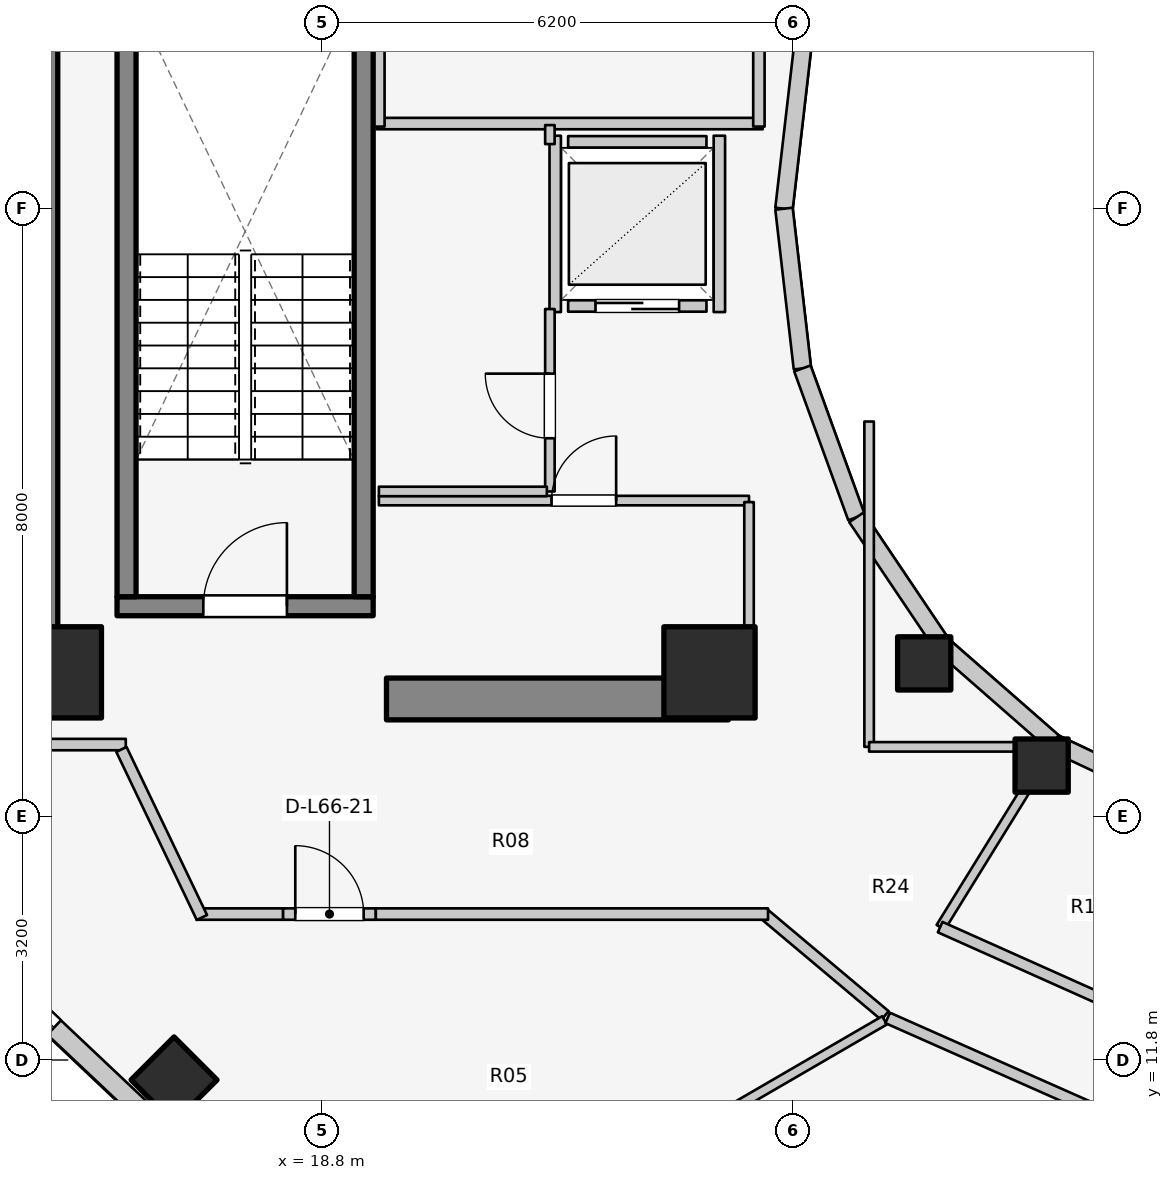
"""IFC4 building model, lengths in metres.
Left out: names, types, materials, properties, quantities, classifications, styles, units other than length and angle.
Written with IfcOpenShell. Run it as: python <this file> out.ifc"""

import sys

from ifc_helpers import new_model, si_unit, direction, frame, frame_2d, origin, origin_2d, place, context, subcontext, project, spatial, rectangle, extrude, element, fill, save


model = new_model("IFC4")
c1 = context("Model", 3, precision=1e-05, world=origin(), true_north=direction((0.0, 1.0)))
c2 = subcontext(c1, "Body", "Model", "MODEL_VIEW")
j1 = project(units=[si_unit("LENGTHUNIT", "METRE"), si_unit("PLANEANGLEUNIT", "RADIAN")], contexts=[c1])
p1 = place(None, origin())
s1 = spatial("IfcSite", under=j1, at=p1, CompositionType="ELEMENT")
p2 = place(p1, origin())
s2 = spatial("IfcBuilding", under=s1, at=p2, CompositionType="ELEMENT")
p3 = place(p2, frame((0.0, 0.0, 217.1)))
s3 = spatial("IfcBuildingStorey", under=s2, at=p3, CompositionType="ELEMENT", Elevation=217.1)
p4 = place(p3, frame((15.05, 17.05, 0.0), z_axis=(0.0, 0.0, 1.0), x_axis=(0.0, 1.0, 0.0)))
e1 = element("IfcWall", 1, at=p4, inside=s3, PredefinedType="SHEAR", context=c2, shape_type="SweptSolid", body=[
    extrude(rectangle(XDim=12.8, YDim=0.55, at=frame_2d((6.4, 0.0))), origin(), (0.0, 0.0, 1.0), 3.1),
])
p5 = place(p3, frame((19.65, 16.55, 0.0), z_axis=(0.0, 0.0, 1.0), x_axis=(1.0, 0.0, 0.0)))
e2 = element("IfcWall", 2, at=p5, inside=s3, PredefinedType="SHEAR", context=c2, shape_type="SweptSolid", body=[
    extrude(rectangle(XDim=4.5, YDim=0.55, at=frame_2d((2.25, 0.0))), origin(), (0.0, 0.0, 1.0), 3.1),
])
p6 = place(p3, frame((16.105, 17.77, 0.0), z_axis=(0.0, 0.0, 1.0), x_axis=(1.0, 0.0, 0.0)))
e3 = element("IfcWall", 3, at=p6, inside=s3, PredefinedType="SOLIDWALL", context=c2, shape_type="SweptSolid", body=[
    extrude(rectangle(XDim=3.37, YDim=0.25, at=frame_2d((1.685, 0.0))), origin(), (0.0, 0.0, 1.0), 3.1),
])
p7 = place(p6, frame((1.135, 0.0, 0.0)))
e4 = element("IfcOpeningElement", 4, at=p7, cuts=e3, PredefinedType="OPENING", context=c2, shape_type="SweptSolid", body=[
    extrude(rectangle(XDim=1.1, YDim=2.1, at=frame_2d((0.55, 1.05))), frame((0.0, 0.135, 0.0), z_axis=(0.0, -1.0, 0.0), x_axis=(1.0, 0.0, 0.0)), (0.0, 0.0, 1.0), 0.27),
])
for number, where, z_axis, x_axis in (
    (5, (16.23, 17.895, 0.0), (0.0, 0.0, 1.0), (0.0, 1.0, 0.0)),
    (6, (19.35, 17.895, 0.0), (0.0, 0.0, 1.0), (0.0, 1.0, 0.0)),
):
    element("IfcWall", number, at=place(p3, frame(where, z_axis=z_axis, x_axis=x_axis)), inside=s3, PredefinedType="SOLIDWALL", context=c2, shape_type="SweptSolid", body=[
        extrude(rectangle(XDim=7.81, YDim=0.25, at=frame_2d((3.905, 0.0))), origin(), (0.0, 0.0, 1.0), 3.1),
    ])
for number, where, z_axis, x_axis in (
    (7, (15.3, 16.9, 0.0), (0.0, 0.0, 1.0), (1.0, 0.0, 0.0)),
    (8, (23.9, 16.9, 0.0), (0.0, 0.0, 1.0), (1.0, 0.0, 0.0)),
):
    element("IfcColumn", number, at=place(p3, frame(where, z_axis=z_axis, x_axis=x_axis)), inside=s3, PredefinedType="COLUMN", context=c2, shape_type="SweptSolid", body=[
        extrude(rectangle(XDim=1.2, YDim=1.2, at=origin_2d()), origin(), (0.0, 0.0, 1.0), 3.1),
    ])
p8 = place(p3, frame((26.725, 17.018, 0.0), z_axis=(0.0, 0.0, 1.0), x_axis=(1.0, 0.0, 0.0)))
e9 = element("IfcColumn", 9, at=p8, inside=s3, PredefinedType="COLUMN", context=c2, shape_type="SweptSolid", body=[
    extrude(rectangle(XDim=0.7, YDim=0.7, at=origin_2d()), origin(), (0.0, 0.0, 1.0), 3.1),
])
p9 = place(p3, frame((16.855, 11.538, 0.0), z_axis=(0.0, 0.0, 1.0), x_axis=(-0.707106781187, -0.707106781187, 0.0)))
e10 = element("IfcColumn", 10, at=p9, inside=s3, PredefinedType="COLUMN", context=c2, shape_type="SweptSolid", body=[
    extrude(rectangle(XDim=0.8, YDim=0.8, at=origin_2d()), origin(), (0.0, 0.0, 1.0), 3.1),
])
p10 = place(p3, frame((28.27, 15.673, 0.0), z_axis=(0.0, 0.0, 1.0), x_axis=(1.0, 0.0, 0.0)))
e11 = element("IfcColumn", 11, at=p10, inside=s3, PredefinedType="COLUMN", context=c2, shape_type="SweptSolid", body=[
    extrude(rectangle(XDim=0.7, YDim=0.7, at=origin_2d()), origin(), (0.0, 0.0, 1.0), 3.1),
])
for number, where, z_axis, x_axis in (
    (12, (25.123, 25.102, 0.0), (0.0, 0.0, 1.0), (-0.115, -0.993, 0.0)),
    (13, (24.88, 23.0, 0.0), (0.0, 0.0, 1.0), (0.115, -0.993, 0.0)),
):
    element("IfcWall", number, at=place(p3, frame(where, z_axis=z_axis, x_axis=x_axis)), inside=s3, PredefinedType="STANDARD", context=c2, shape_type="SweptSolid", body=[
        extrude(rectangle(XDim=2.115, YDim=0.23, at=frame_2d((1.058, 0.0))), origin(), (0.0, 0.0, 1.0), 2.56),
    ])
p11 = place(p3, frame((25.123, 20.898, 0.0), z_axis=(0.0, 0.0, 1.0), x_axis=(0.341423187295, -0.93990968033, 0.0)))
e14 = element("IfcWall", 14, at=p11, inside=s3, PredefinedType="STANDARD", context=c2, shape_type="SweptSolid", body=[
    extrude(rectangle(XDim=2.084, YDim=0.23, at=frame_2d((1.042, 0.0))), origin(), (0.0, 0.0, 1.0), 2.56),
])
p12 = place(p3, frame((25.834, 18.94, 0.0), z_axis=(0.0, 0.0, 1.0), x_axis=(0.558197800898, -0.829707909492, 0.0)))
e15 = element("IfcWall", 15, at=p12, inside=s3, PredefinedType="STANDARD", context=c2, shape_type="SweptSolid", body=[
    extrude(rectangle(XDim=2.027, YDim=0.23, at=frame_2d((1.013, 0.0))), origin(), (0.0, 0.0, 1.0), 1.22),
])
p13 = place(p3, frame((26.965, 17.258, 0.0), z_axis=(0.0, 0.0, 1.0), x_axis=(0.752576694707, -0.658504607869, 0.0)))
e16 = element("IfcWall", 16, at=p13, inside=s3, PredefinedType="STANDARD", context=c2, shape_type="SweptSolid", body=[
    extrude(rectangle(XDim=1.959, YDim=0.23, at=frame_2d((0.98, 0.0))), origin(), (0.0, 0.0, 1.0), 1.22),
])
p14 = place(p3, frame((28.44, 15.968, 0.0), z_axis=(0.0, 0.0, 1.0), x_axis=(0.904179699603, -0.427152280606, 0.0)))
e17 = element("IfcWall", 17, at=p14, inside=s3, PredefinedType="STANDARD", context=c2, shape_type="SweptSolid", body=[
    extrude(rectangle(XDim=1.899, YDim=0.23, at=frame_2d((0.95, 0.0))), origin(), (0.0, 0.0, 1.0), 1.22),
])
p15 = place(p3, frame((13.239, 14.151, 0.0), z_axis=(0.0, 0.0, 1.0), x_axis=(0.72731899451, -0.686299555752, 0.0)))
e18 = element("IfcWall", 18, at=p15, inside=s3, PredefinedType="STANDARD", context=c2, shape_type="SweptSolid", body=[
    extrude(rectangle(XDim=4.404, YDim=0.26, at=frame_2d((2.202, 0.0))), origin(), (0.0, 0.0, 1.0), 1.22),
])
p16 = place(p15, frame((1.602, 0.0, 0.15)))
e19 = element("IfcOpeningElement", 19, at=p16, cuts=e18, PredefinedType="OPENING", context=c2, shape_type="SweptSolid", body=[
    extrude(rectangle(XDim=1.2, YDim=0.9, at=frame_2d((0.6, 0.45))), frame((0.0, 0.14, 0.0), z_axis=(0.0, -1.0, 0.0), x_axis=(1.0, 0.0, 0.0)), (0.0, 0.0, 1.0), 0.28),
])
p17 = place(p3, frame((22.04, 21.72, 0.0), z_axis=(0.0, 0.0, 1.0), x_axis=(1.0, 0.0, 0.0)))
e20 = element("IfcWall", 20, at=p17, inside=s3, PredefinedType="SOLIDWALL", context=c2, shape_type="SweptSolid", body=[
    extrude(rectangle(XDim=1.82, YDim=0.15, at=frame_2d((0.91, 0.0))), origin(), (0.0, 0.0, 1.0), 2.12),
])
p18 = place(p17, frame((0.36, 0.0, 0.0)))
e21 = element("IfcOpeningElement", 21, at=p18, cuts=e20, PredefinedType="OPENING", context=c2, shape_type="SweptSolid", body=[
    extrude(rectangle(XDim=1.1, YDim=2.1, at=frame_2d((0.55, 1.05))), frame((0.0, 0.085, 0.0), z_axis=(0.0, -1.0, 0.0), x_axis=(1.0, 0.0, 0.0)), (0.0, 0.0, 1.0), 0.17),
])
p19 = place(p3, frame((22.04, 23.88, 0.0), z_axis=(0.0, 0.0, 1.0), x_axis=(1.0, 0.0, 0.0)))
e22 = element("IfcWall", 22, at=p19, inside=s3, PredefinedType="SOLIDWALL", context=c2, shape_type="SweptSolid", body=[
    extrude(rectangle(XDim=1.82, YDim=0.15, at=frame_2d((0.91, 0.0))), origin(), (0.0, 0.0, 1.0), 2.12),
])
p20 = place(p3, frame((21.87, 21.64, 0.0), z_axis=(0.0, 0.0, 1.0), x_axis=(0.0, 1.0, 0.0)))
e23 = element("IfcWall", 23, at=p20, inside=s3, PredefinedType="SOLIDWALL", context=c2, shape_type="SweptSolid", body=[
    extrude(rectangle(XDim=2.32, YDim=0.15, at=frame_2d((1.16, 0.0))), origin(), (0.0, 0.0, 1.0), 2.575),
])
p21 = place(p3, frame((24.03, 21.64, 0.0), z_axis=(0.0, 0.0, 1.0), x_axis=(0.0, 1.0, 0.0)))
e24 = element("IfcWall", 24, at=p21, inside=s3, PredefinedType="SOLIDWALL", context=c2, shape_type="SweptSolid", body=[
    extrude(rectangle(XDim=2.32, YDim=0.15, at=frame_2d((1.16, 0.0))), origin(), (0.0, 0.0, 1.0), 2.12),
])
p22 = place(p3, frame((19.52, 24.12, 0.0), z_axis=(0.0, 0.0, 1.0), x_axis=(1.0, 0.0, 0.0)))
e25 = element("IfcWall", 25, at=p22, inside=s3, PredefinedType="PARTITIONING", context=c2, shape_type="SweptSolid", body=[
    extrude(rectangle(XDim=5.08, YDim=0.15, at=frame_2d((2.54, 0.0))), origin(), (0.0, 0.0, 1.0), 2.12),
])
p23 = place(p3, frame((19.55, 24.08, 0.0), z_axis=(0.0, 0.0, 1.0), x_axis=(0.0, 1.0, 0.0)))
e26 = element("IfcWall", 26, at=p23, inside=s3, PredefinedType="PARTITIONING", context=c2, shape_type="SweptSolid", body=[
    extrude(rectangle(XDim=3.2, YDim=0.15, at=frame_2d((1.6, 0.0))), origin(), (0.0, 0.0, 1.0), 2.575),
])
p24 = place(p3, frame((24.55, 24.08, 0.0), z_axis=(0.0, 0.0, 1.0), x_axis=(0.0, 1.0, 0.0)))
e27 = element("IfcWall", 27, at=p24, inside=s3, PredefinedType="PARTITIONING", context=c2, shape_type="SweptSolid", body=[
    extrude(rectangle(XDim=3.4, YDim=0.15, at=frame_2d((1.7, 0.0))), origin(), (0.0, 0.0, 1.0), 2.575),
])
p25 = place(p24, frame((1.894, 0.0, 0.0)))
e28 = element("IfcOpeningElement", 28, at=p25, cuts=e27, PredefinedType="OPENING", context=c2, shape_type="SweptSolid", body=[
    extrude(rectangle(XDim=1.1, YDim=2.1, at=frame_2d((0.55, 1.05))), frame((0.0, 0.085, 0.0), z_axis=(0.0, -1.0, 0.0), x_axis=(1.0, 0.0, 0.0)), (0.0, 0.0, 1.0), 0.17),
])
p26 = place(p3, frame((19.55, 19.16, 0.0), z_axis=(0.0, 0.0, 1.0), x_axis=(1.0, 0.0, 0.0)))
e29 = element("IfcWall", 29, at=p26, inside=s3, PredefinedType="PARTITIONING", context=c2, shape_type="SweptSolid", body=[
    extrude(rectangle(XDim=4.87, YDim=0.125, at=frame_2d((2.435, 0.0))), origin(), (0.0, 0.0, 1.0), 2.12),
])
p27 = place(p26, frame((2.272, 0.0, 0.0)))
e30 = element("IfcOpeningElement", 30, at=p27, cuts=e29, PredefinedType="OPENING", context=c2, shape_type="SweptSolid", body=[
    extrude(rectangle(XDim=0.85, YDim=2.05, at=frame_2d((0.425, 1.025))), frame((0.0, 0.073, 0.0), z_axis=(0.0, -1.0, 0.0), x_axis=(1.0, 0.0, 0.0)), (0.0, 0.0, 1.0), 0.145),
])
p28 = place(p3, frame((24.42, 17.1, 0.0), z_axis=(0.0, 0.0, 1.0), x_axis=(0.0, 1.0, 0.0)))
e31 = element("IfcWall", 31, at=p28, inside=s3, PredefinedType="PARTITIONING", context=c2, shape_type="SweptSolid", body=[
    extrude(rectangle(XDim=2.04, YDim=0.125, at=frame_2d((1.02, 0.0))), origin(), (0.0, 0.0, 1.0), 1.952),
])
p29 = place(p3, frame((21.8, 19.28, 0.0), z_axis=(0.0, 0.0, 1.0), x_axis=(0.0, 1.0, 0.0)))
e32 = element("IfcWall", 32, at=p29, inside=s3, PredefinedType="PARTITIONING", context=c2, shape_type="SweptSolid", body=[
    extrude(rectangle(XDim=2.4, YDim=0.125, at=frame_2d((1.2, 0.0))), origin(), (0.0, 0.0, 1.0), 2.575),
])
p30 = place(p29, frame((0.7, 0.0, 0.0)))
e33 = element("IfcOpeningElement", 33, at=p30, cuts=e32, PredefinedType="OPENING", context=c2, shape_type="SweptSolid", body=[
    extrude(rectangle(XDim=0.85, YDim=2.05, at=frame_2d((0.425, 1.025))), frame((0.0, 0.073, 0.0), z_axis=(0.0, -1.0, 0.0), x_axis=(1.0, 0.0, 0.0)), (0.0, 0.0, 1.0), 0.145),
])
p31 = place(p3, frame((21.8, 23.85, 0.0), z_axis=(0.0, 0.0, 1.0), x_axis=(0.0, 1.0, 0.0)))
e34 = element("IfcWall", 34, at=p31, inside=s3, PredefinedType="PARTITIONING", context=c2, shape_type="SweptSolid", body=[
    extrude(rectangle(XDim=0.25, YDim=0.125, at=frame_2d((0.125, 0.0))), origin(), (0.0, 0.0, 1.0), 2.575),
])
p32 = place(p3, frame((19.55, 19.28, 0.0), z_axis=(0.0, 0.0, 1.0), x_axis=(1.0, 0.0, 0.0)))
e35 = element("IfcWall", 35, at=p32, inside=s3, PredefinedType="PARTITIONING", context=c2, shape_type="SweptSolid", body=[
    extrude(rectangle(XDim=2.21, YDim=0.125, at=frame_2d((1.105, 0.0))), origin(), (0.0, 0.0, 1.0), 2.12),
])
p33 = place(p3, frame((28.45, 15.985, 0.0), z_axis=(0.0, 0.0, 1.0), x_axis=(-0.52592395012, -0.850531597702, 0.0)))
e36 = element("IfcWall", 36, at=p33, inside=s3, PredefinedType="PARTITIONING", context=c2, shape_type="SweptSolid", body=[
    extrude(rectangle(XDim=2.869, YDim=0.125, at=frame_2d((1.435, 0.0))), origin(), (0.0, 0.0, 1.0), 1.22),
])
p34 = place(p3, frame((26.935, 13.549, 0.0), z_axis=(0.0, 0.0, 1.0), x_axis=(0.912859324183, -0.408274239027, 0.0)))
e37 = element("IfcWall", 37, at=p34, inside=s3, PredefinedType="PARTITIONING", context=c2, shape_type="SweptSolid", body=[
    extrude(rectangle(XDim=2.682, YDim=0.15, at=frame_2d((1.341, 0.0))), origin(), (0.0, 0.0, 1.0), 1.22),
])
p35 = place(p3, frame((26.0, 15.92, 0.0), z_axis=(0.0, 0.0, 1.0), x_axis=(0.0, 1.0, 0.0)))
e38 = element("IfcWall", 38, at=p35, inside=s3, PredefinedType="PARTITIONING", context=c2, shape_type="SweptSolid", body=[
    extrude(rectangle(XDim=4.28, YDim=0.125, at=frame_2d((2.14, 0.0))), origin(), (0.0, 0.0, 1.0), 1.22),
])
p36 = place(p3, frame((26.0, 15.92, 0.0), z_axis=(0.0, 0.0, 1.0), x_axis=(1.0, 0.0, 0.0)))
e39 = element("IfcWall", 39, at=p36, inside=s3, PredefinedType="PARTITIONING", context=c2, shape_type="SweptSolid", body=[
    extrude(rectangle(XDim=2.6, YDim=0.125, at=frame_2d((1.3, 0.0))), origin(), (0.0, 0.0, 1.0), 1.22),
])
p37 = place(p3, frame((11.98, 15.95, 0.0), z_axis=(0.0, 0.0, 1.0), x_axis=(1.0, 0.0, 0.0)))
e40 = element("IfcWall", 40, at=p37, inside=s3, PredefinedType="PARTITIONING", context=c2, shape_type="SweptSolid", body=[
    extrude(rectangle(XDim=4.24, YDim=0.15, at=frame_2d((2.12, 0.0))), origin(), (0.0, 0.0, 1.0), 1.22),
])
p38 = place(p3, frame((26.209, 12.385, 0.0), z_axis=(0.0, 0.0, 1.0), x_axis=(-0.765677451641, 0.643224719711, 0.0)))
e41 = element("IfcWall", 41, at=p38, inside=s3, PredefinedType="PARTITIONING", context=c2, shape_type="SweptSolid", body=[
    extrude(rectangle(XDim=2.105, YDim=0.15, at=frame_2d((1.053, 0.0))), origin(), (0.0, 0.0, 1.0), 1.22),
])
p39 = place(p3, frame((17.15, 13.72, 0.0), z_axis=(0.0, 0.0, 1.0), x_axis=(1.0, 0.0, 0.0)))
e42 = element("IfcWall", 42, at=p39, inside=s3, PredefinedType="PARTITIONING", context=c2, shape_type="SweptSolid", body=[
    extrude(rectangle(XDim=1.14, YDim=0.15, at=frame_2d((0.57, 0.0))), origin(), (0.0, 0.0, 1.0), 2.575),
])
p40 = place(p3, frame((18.29, 13.72, 0.0), z_axis=(0.0, 0.0, 1.0), x_axis=(1.0, 0.0, 0.0)))
e43 = element("IfcWall", 43, at=p40, inside=s3, PredefinedType="PARTITIONING", context=c2, shape_type="SweptSolid", body=[
    extrude(rectangle(XDim=1.22, YDim=0.15, at=frame_2d((0.61, 0.0))), origin(), (0.0, 0.0, 1.0), 2.575),
])
p41 = place(p40, frame((0.16, 0.0, 0.0)))
e44 = element("IfcOpeningElement", 44, at=p41, cuts=e43, PredefinedType="OPENING", context=c2, shape_type="SweptSolid", body=[
    extrude(rectangle(XDim=0.9, YDim=2.1, at=frame_2d((0.45, 1.05))), frame((0.0, 0.085, 0.0), z_axis=(0.0, -1.0, 0.0), x_axis=(1.0, 0.0, 0.0)), (0.0, 0.0, 1.0), 0.17),
])
p42 = place(p3, frame((19.51, 13.72, 0.0), z_axis=(0.0, 0.0, 1.0), x_axis=(1.0, 0.0, 0.0)))
e45 = element("IfcWall", 45, at=p42, inside=s3, PredefinedType="PARTITIONING", context=c2, shape_type="SweptSolid", body=[
    extrude(rectangle(XDim=5.16, YDim=0.15, at=frame_2d((2.58, 0.0))), origin(), (0.0, 0.0, 1.0), 1.22),
])
p43 = place(p3, frame((17.222, 13.675, 0.0), z_axis=(0.0, 0.0, 1.0), x_axis=(-0.431973389813, 0.901886351207, 0.0)))
e46 = element("IfcWall", 46, at=p43, inside=s3, PredefinedType="PARTITIONING", context=c2, shape_type="SweptSolid", body=[
    extrude(rectangle(XDim=2.452, YDim=0.15, at=frame_2d((1.226, 0.0))), origin(), (0.0, 0.0, 1.0), 2.575),
])
p44 = place(p3, frame((26.203, 12.322, 0.0), z_axis=(0.0, 0.0, 1.0), x_axis=(-0.864712462127, -0.502267217567, 0.0)))
e47 = element("IfcWall", 47, at=p44, inside=s3, PredefinedType="PARTITIONING", context=c2, shape_type="SweptSolid", body=[
    extrude(rectangle(XDim=6.439, YDim=0.125, at=frame_2d((3.22, 0.0))), origin(), (0.0, 0.0, 1.0), 1.22),
])
p45 = place(p3, frame((26.244, 12.354, 0.0), z_axis=(0.0, 0.0, 1.0), x_axis=(0.914302802833, -0.405031337963, 0.0)))
e48 = element("IfcWall", 48, at=p45, inside=s3, PredefinedType="PARTITIONING", context=c2, shape_type="SweptSolid", body=[
    extrude(rectangle(XDim=3.049, YDim=0.15, at=frame_2d((1.525, 0.0))), origin(), (0.0, 0.0, 1.0), 1.22),
])
p46 = place(p16, origin())
e49 = element("IfcWindow", 49, at=p46, inside=s3, PartitioningType="SINGLE_PANEL", PredefinedType="WINDOW", context=c2, shape_type="SweptSolid", body=[
    extrude(rectangle(XDim=1.2, YDim=0.9, at=frame_2d((0.6, 0.45))), frame((0.0, 0.03, 0.0), z_axis=(0.0, -1.0, 0.0), x_axis=(1.0, 0.0, 0.0)), (0.0, 0.0, 1.0), 0.06),
])
fill(e19, e49)
p47 = place(p7, origin())
e50 = element("IfcDoor", 50, at=p47, inside=s3, OperationType="SINGLE_SWING_RIGHT", PredefinedType="DOOR", context=c2, shape_type="SweptSolid", body=[
    extrude(rectangle(XDim=1.1, YDim=2.1, at=frame_2d((0.55, 1.05))), frame((0.0, 0.025, 0.0), z_axis=(0.0, -1.0, 0.0), x_axis=(1.0, 0.0, 0.0)), (0.0, 0.0, 1.0), 0.05),
])
fill(e4, e50)
p48 = place(p18, origin())
e51 = element("IfcDoor", 51, at=p48, inside=s3, OperationType="DOUBLE_DOOR_SLIDING", PredefinedType="DOOR", context=c2, shape_type="SweptSolid", body=[
    extrude(rectangle(XDim=1.1, YDim=2.1, at=frame_2d((0.55, 1.05))), frame((0.0, 0.025, 0.0), z_axis=(0.0, -1.0, 0.0), x_axis=(1.0, 0.0, 0.0)), (0.0, 0.0, 1.0), 0.05),
])
fill(e21, e51)
p49 = place(p27, origin())
e52 = element("IfcDoor", 52, at=p49, inside=s3, OperationType="SINGLE_SWING_RIGHT", PredefinedType="DOOR", context=c2, shape_type="SweptSolid", body=[
    extrude(rectangle(XDim=0.85, YDim=2.05, at=frame_2d((0.425, 1.025))), frame((0.0, 0.025, 0.0), z_axis=(0.0, -1.0, 0.0), x_axis=(1.0, 0.0, 0.0)), (0.0, 0.0, 1.0), 0.05),
])
fill(e30, e52)
p50 = place(p30, origin())
e53 = element("IfcDoor", 53, at=p50, inside=s3, OperationType="SINGLE_SWING_RIGHT", PredefinedType="DOOR", context=c2, shape_type="SweptSolid", body=[
    extrude(rectangle(XDim=0.85, YDim=2.05, at=frame_2d((0.425, 1.025))), frame((0.0, 0.025, 0.0), z_axis=(0.0, -1.0, 0.0), x_axis=(1.0, 0.0, 0.0)), (0.0, 0.0, 1.0), 0.05),
])
fill(e33, e53)
p51 = place(p41, origin())
e54 = element("IfcDoor", 54, at=p51, inside=s3, OperationType="SINGLE_SWING_LEFT", PredefinedType="DOOR", context=c2, shape_type="SweptSolid", body=[
    extrude(rectangle(XDim=0.9, YDim=2.1, at=frame_2d((0.45, 1.05))), frame((0.0, 0.025, 0.0), z_axis=(0.0, -1.0, 0.0), x_axis=(1.0, 0.0, 0.0)), (0.0, 0.0, 1.0), 0.05),
])
fill(e44, e54)
save(model, sys.argv[1])
